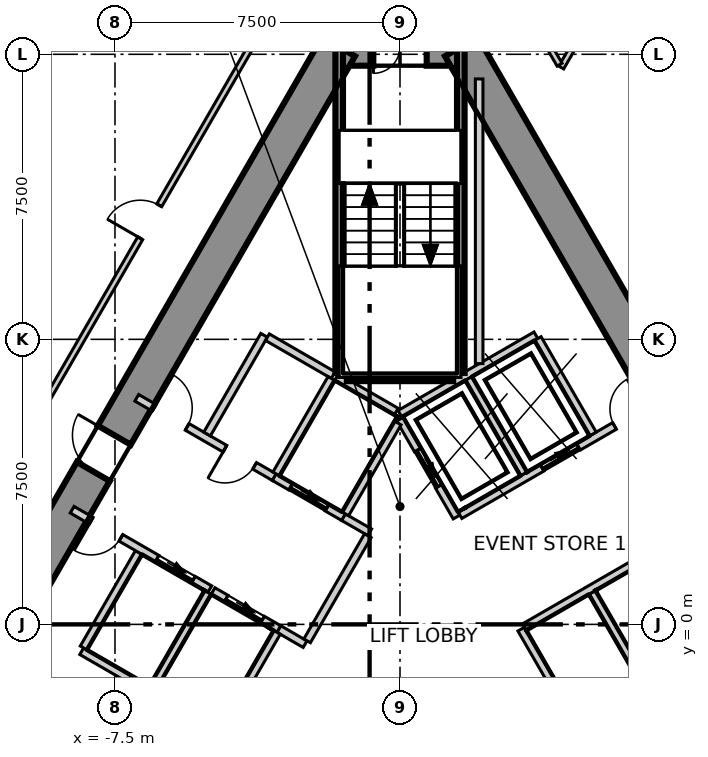
"""IFC4 building model, lengths in metres.
Left out: names, types, materials, properties, quantities, classifications, styles, units other than length and angle.
Written with IfcOpenShell. Run it as: python <this file> out.ifc"""

import sys

from ifc_helpers import new_model, si_unit, direction, frame, frame_2d, origin, place, context, subcontext, project, spatial, polyline, rectangle, outline, extrude, element, fill, save


model = new_model("IFC4")
c1 = context("Model", 3, precision=1e-05, world=origin(), true_north=direction((0.0, 1.0)))
c2 = subcontext(c1, "Body", "Model", "MODEL_VIEW")
j1 = project(units=[si_unit("LENGTHUNIT", "METRE"), si_unit("PLANEANGLEUNIT", "RADIAN")], contexts=[c1])
p1 = place(None, origin())
s1 = spatial("IfcSite", under=j1, at=p1, CompositionType="ELEMENT")
p2 = place(p1, origin())
s2 = spatial("IfcBuilding", under=s1, at=p2, CompositionType="ELEMENT")
p3 = place(p2, frame((0.0, 0.0, 30.3)))
s3 = spatial("IfcBuildingStorey", under=s2, at=p3, CompositionType="ELEMENT", Elevation=30.3)
p4 = place(p3, frame((1.617, 15.2, -0.4), z_axis=(0.0, 0.0, 1.0), x_axis=(-1.0, 0.0, 0.0)))
e1 = element("IfcWall", 1, at=p4, inside=s3, PredefinedType="SHEAR", context=c2, shape_type="SweptSolid", body=[
    extrude(outline(polyline([(-0.288, -0.5), (1.617, -0.5), (3.522, -0.5), (2.945, 0.5), (1.617, 0.5), (0.289, 0.5), (-0.288, -0.5)])), origin(), (0.0, 0.0, 1.0), 5.1),
])
p5 = place(p4, frame((0.917, 0.0, 0.4)))
e2 = element("IfcOpeningElement", 2, at=p5, cuts=e1, PredefinedType="OPENING", context=c2, shape_type="SweptSolid", body=[
    extrude(rectangle(XDim=1.4, YDim=2.1, at=frame_2d((0.7, 1.05))), frame((0.0, 0.51, 0.0), z_axis=(0.0, -1.0, 0.0), x_axis=(1.0, 0.0, 0.0)), (0.0, 0.0, 1.0), 1.02),
])
p6 = place(p3, frame((-1.617, 15.2, -0.4), z_axis=(0.0, 0.0, 1.0), x_axis=(-0.499992141631, -0.866029940768, 0.0)))
e3 = element("IfcWall", 3, at=p6, inside=s3, PredefinedType="SHEAR", context=c2, shape_type="SweptSolid", body=[
    extrude(outline(polyline([(-0.289, -0.499), (1.656, -0.499), (3.601, -0.499), (5.547, -0.499), (7.492, -0.499), (9.437, -0.5), (11.382, -0.5), (13.328, -0.5), (15.273, -0.5), (17.218, -0.5), (19.163, -0.5), (21.109, -0.5), (23.054, -0.5), (24.999, -0.5), (24.422, 0.5), (22.566, 0.5), (20.709, 0.5), (18.853, 0.5), (16.997, 0.5), (15.14, 0.5), (13.284, 0.5), (11.427, 0.5), (9.571, 0.5), (7.715, 0.5), (5.858, 0.5), (4.002, 0.5), (2.146, 0.5), (0.289, 0.5), (-0.289, -0.499)])), origin(), (0.0, 0.0, 1.0), 5.1),
])
p7 = place(p6, frame((11.805, 0.0, 0.4)))
e4 = element("IfcOpeningElement", 4, at=p7, cuts=e3, PredefinedType="OPENING", context=c2, shape_type="SweptSolid", body=[
    extrude(rectangle(XDim=1.1, YDim=2.1, at=frame_2d((0.55, 1.05))), frame((0.0, 0.51, 0.0), z_axis=(0.0, -1.0, 0.0), x_axis=(1.0, 0.0, 0.0)), (0.0, 0.0, 1.0), 1.02),
])
p8 = place(p3, frame((13.972, -6.2, -0.4), z_axis=(0.0, 0.0, 1.0), x_axis=(-0.499992141631, 0.866029940768, 0.0)))
e5 = element("IfcWall", 5, at=p8, inside=s3, PredefinedType="SHEAR", context=c2, shape_type="SweptSolid", body=[
    extrude(outline(polyline([(-0.288, -0.5), (1.657, -0.5), (3.602, -0.5), (5.547, -0.5), (7.493, -0.5), (9.438, -0.5), (11.383, -0.5), (13.328, -0.5), (15.273, -0.5), (17.218, -0.499), (19.164, -0.499), (21.109, -0.499), (23.054, -0.499), (24.999, -0.499), (24.422, 0.5), (22.566, 0.5), (20.709, 0.5), (18.853, 0.5), (16.996, 0.5), (15.14, 0.5), (13.283, 0.5), (11.427, 0.5), (9.57, 0.5), (7.714, 0.5), (5.857, 0.5), (4.001, 0.5), (2.145, 0.5), (0.288, 0.5), (-0.288, -0.5)])), origin(), (0.0, 0.0, 1.0), 5.1),
])
p9 = place(p8, frame((11.455, 0.0, 0.4)))
e6 = element("IfcOpeningElement", 6, at=p9, cuts=e5, PredefinedType="OPENING", context=c2, shape_type="SweptSolid", body=[
    extrude(rectangle(XDim=1.8, YDim=2.1, at=frame_2d((0.9, 1.05))), frame((0.0, 0.51, 0.0), z_axis=(0.0, -1.0, 0.0), x_axis=(1.0, 0.0, 0.0)), (0.0, 0.0, 1.0), 1.02),
])
p10 = place(p3, frame((-9.489, 5.565, 0.0), z_axis=(0.0, 0.0, 1.0), x_axis=(0.500030231307, 0.866007949028, 0.0)))
e7 = element("IfcWall", 7, at=p10, inside=s3, PredefinedType="PARTITIONING", context=c2, shape_type="SweptSolid", body=[
    extrude(rectangle(XDim=13.435, YDim=0.15, at=frame_2d((6.718, 0.0))), origin(), (0.0, 0.0, 1.0), 4.7),
])
p11 = place(p10, frame((5.307, 0.0, 0.0)))
e8 = element("IfcOpeningElement", 8, at=p11, cuts=e7, PredefinedType="OPENING", context=c2, shape_type="SweptSolid", body=[
    extrude(rectangle(XDim=1.0, YDim=2.1, at=frame_2d((0.5, 1.05))), frame((0.0, 0.085, 0.0), z_axis=(0.0, -1.0, 0.0), x_axis=(1.0, 0.0, 0.0)), (0.0, 0.0, 1.0), 0.17),
])
p12 = place(p3, frame((4.242, 14.652, 0.0), z_axis=(0.0, 0.0, 1.0), x_axis=(0.500016782699, 0.866015714072, 0.0)))
e9 = element("IfcWall", 9, at=p12, inside=s3, PredefinedType="PARTITIONING", context=c2, shape_type="SweptSolid", body=[
    extrude(rectangle(XDim=13.164, YDim=0.15, at=frame_2d((6.582, 0.0))), origin(), (0.0, 0.0, 1.0), 4.7),
])
p13 = place(p12, frame((3.858, 0.0, 0.0)))
e10 = element("IfcOpeningElement", 10, at=p13, cuts=e9, PredefinedType="OPENING", context=c2, shape_type="SweptSolid", body=[
    extrude(rectangle(XDim=1.0, YDim=2.1, at=frame_2d((0.5, 1.05))), frame((0.0, 0.085, 0.0), z_axis=(0.0, -1.0, 0.0), x_axis=(1.0, 0.0, 0.0)), (0.0, 0.0, 1.0), 0.17),
])
p14 = place(p12, frame((9.763, 0.0, 0.0)))
e11 = element("IfcOpeningElement", 11, at=p14, cuts=e9, PredefinedType="OPENING", context=c2, shape_type="SweptSolid", body=[
    extrude(rectangle(XDim=1.0, YDim=2.1, at=frame_2d((0.5, 1.05))), frame((0.0, 0.085, 0.0), z_axis=(0.0, -1.0, 0.0), x_axis=(1.0, 0.0, 0.0)), (0.0, 0.0, 1.0), 0.17),
])
p15 = place(p3, frame((2.771, 17.2, 0.0), z_axis=(0.0, 0.0, 1.0), x_axis=(0.500065346707, -0.865987672558, 0.0)))
e12 = element("IfcWall", 12, at=p15, inside=s3, PredefinedType="PARTITIONING", context=c2, shape_type="SweptSolid", body=[
    extrude(rectangle(XDim=2.855, YDim=0.15, at=frame_2d((1.428, 0.0))), origin(), (0.0, 0.0, 1.0), 4.7),
])
p16 = place(p3, frame((-8.376, -0.707, 0.0), z_axis=(0.0, 0.0, 1.0), x_axis=(0.866067520717, -0.499927044236, 0.0)))
e13 = element("IfcWall", 13, at=p16, inside=s3, PredefinedType="SOLIDWALL", context=c2, shape_type="SweptSolid", body=[
    extrude(rectangle(XDim=2.1, YDim=0.2, at=frame_2d((1.05, 0.0))), origin(), (0.0, 0.0, 1.0), 4.7),
])
p17 = place(p3, frame((-8.326, -0.62, 0.0), z_axis=(0.0, 0.0, 1.0), x_axis=(0.500023687443, 0.866011727401, 0.0)))
e14 = element("IfcWall", 14, at=p17, inside=s3, PredefinedType="SOLIDWALL", context=c2, shape_type="SweptSolid", body=[
    extrude(rectangle(XDim=2.9, YDim=0.2, at=frame_2d((1.45, 0.0))), origin(), (0.0, 0.0, 1.0), 4.7),
])
p18 = place(p3, frame((-0.002, 5.541, 0.0), z_axis=(0.0, 0.0, 1.0), x_axis=(0.86600155993, 0.500041296494, 0.0)))
e15 = element("IfcWall", 15, at=p18, inside=s3, PredefinedType="SOLIDWALL", context=c2, shape_type="SweptSolid", body=[
    extrude(rectangle(XDim=4.132, YDim=0.2, at=frame_2d((2.066, 0.0))), origin(), (0.0, 0.0, 1.0), 4.7),
])
p19 = place(p3, frame((0.0, 5.4, 0.0), z_axis=(0.0, 0.0, 1.0), x_axis=(0.500103862429, -0.865965430478, 0.0)))
e16 = element("IfcWall", 16, at=p19, inside=s3, PredefinedType="SOLIDWALL", context=c2, shape_type="SweptSolid", body=[
    extrude(rectangle(XDim=2.973, YDim=0.2, at=frame_2d((1.487, 0.0))), origin(), (0.0, 0.0, 1.0), 4.7),
])
p20 = place(p19, frame((0.937, 0.0, 0.0)))
e17 = element("IfcOpeningElement", 17, at=p20, cuts=e16, PredefinedType="OPENING", context=c2, shape_type="SweptSolid", body=[
    extrude(rectangle(XDim=1.1, YDim=2.1, at=frame_2d((0.55, 1.05))), frame((0.0, 0.11, 0.0), z_axis=(0.0, -1.0, 0.0), x_axis=(1.0, 0.0, 0.0)), (0.0, 0.0, 1.0), 0.22),
])
p21 = place(p3, frame((3.19, -0.125, 0.0), z_axis=(0.0, 0.0, 1.0), x_axis=(0.499988658015, -0.866031951983, 0.0)))
e18 = element("IfcWall", 18, at=p21, inside=s3, PredefinedType="SOLIDWALL", context=c2, shape_type="SweptSolid", body=[
    extrude(rectangle(XDim=2.858, YDim=0.2, at=frame_2d((1.429, 0.0))), origin(), (0.0, 0.0, 1.0), 4.7),
])
p22 = place(p3, frame((1.578, 2.874, 0.0), z_axis=(0.0, 0.0, 1.0), x_axis=(0.866055259465, 0.499948284879, 0.0)))
e19 = element("IfcWall", 19, at=p22, inside=s3, PredefinedType="SOLIDWALL", context=c2, shape_type="SweptSolid", body=[
    extrude(rectangle(XDim=6.177, YDim=0.2, at=frame_2d((3.088, 0.0))), origin(), (0.0, 0.0, 1.0), 4.7),
])
p23 = place(p22, frame((2.496, 0.0, 0.0)))
e20 = element("IfcOpeningElement", 20, at=p23, cuts=e19, PredefinedType="OPENING", context=c2, shape_type="SweptSolid", body=[
    extrude(rectangle(XDim=1.1, YDim=2.1, at=frame_2d((0.55, 1.05))), frame((0.0, 0.11, 0.0), z_axis=(0.0, -1.0, 0.0), x_axis=(1.0, 0.0, 0.0)), (0.0, 0.0, 1.0), 0.22),
])
p24 = place(p22, frame((4.696, 0.0, 0.0)))
e21 = element("IfcOpeningElement", 21, at=p24, cuts=e19, PredefinedType="OPENING", context=c2, shape_type="SweptSolid", body=[
    extrude(rectangle(XDim=0.9, YDim=2.1, at=frame_2d((0.45, 1.05))), frame((0.0, 0.11, 0.0), z_axis=(0.0, -1.0, 0.0), x_axis=(1.0, 0.0, 0.0)), (0.0, 0.0, 1.0), 0.22),
])
for number, where, z_axis, x_axis in (
    (22, (1.807, 6.47, 0.0), (0.0, 0.0, 1.0), (0.5, -0.866, 0.0)),
    (23, (5.057, 0.841, 0.0), (0.0, 0.0, 1.0), (0.5, -0.866, 0.0)),
    (24, (3.626, 7.52, 0.0), (0.0, 0.0, 1.0), (0.5, -0.866, 0.0)),
):
    element("IfcWall", number, at=place(p3, frame(where, z_axis=z_axis, x_axis=x_axis)), inside=s3, PredefinedType="SOLIDWALL", context=c2, shape_type="SweptSolid", body=[
        extrude(rectangle(XDim=2.9, YDim=0.2, at=frame_2d((1.45, 0.0))), origin(), (0.0, 0.0, 1.0), 4.7),
    ])
p25 = place(p3, frame((3.278, -0.071, 0.0), z_axis=(0.0, 0.0, 1.0), x_axis=(0.865959795517, 0.500113619639, 0.0)))
e25 = element("IfcWall", 25, at=p25, inside=s3, PredefinedType="SOLIDWALL", context=c2, shape_type="SweptSolid", body=[
    extrude(rectangle(XDim=6.177, YDim=0.2, at=frame_2d((3.088, 0.0))), origin(), (0.0, 0.0, 1.0), 4.7),
])
p26 = place(p25, frame((4.697, 0.0, 0.0)))
e26 = element("IfcOpeningElement", 26, at=p26, cuts=e25, PredefinedType="OPENING", context=c2, shape_type="SweptSolid", body=[
    extrude(rectangle(XDim=0.9, YDim=2.1, at=frame_2d((0.45, 1.05))), frame((0.0, 0.11, 0.0), z_axis=(0.0, -1.0, 0.0), x_axis=(1.0, 0.0, 0.0)), (0.0, 0.0, 1.0), 0.22),
])
p27 = place(p3, frame((4.9, -2.714, 0.0), z_axis=(0.0, 0.0, 1.0), x_axis=(0.865992350556, 0.500057245502, 0.0)))
e27 = element("IfcWall", 27, at=p27, inside=s3, PredefinedType="SOLIDWALL", context=c2, shape_type="SweptSolid", body=[
    extrude(rectangle(XDim=3.914, YDim=0.2, at=frame_2d((1.957, 0.0))), origin(), (0.0, 0.0, 1.0), 4.7),
])
p28 = place(p3, frame((-8.627, 3.018, 0.0), z_axis=(0.0, 0.0, 1.0), x_axis=(0.866039775641, -0.499975106388, 0.0)))
e28 = element("IfcWall", 28, at=p28, inside=s3, PredefinedType="SOLIDWALL", context=c2, shape_type="SweptSolid", body=[
    extrude(rectangle(XDim=4.182, YDim=0.2, at=frame_2d((2.091, 0.0))), origin(), (0.0, 0.0, 1.0), 4.7),
])
p29 = place(p28, frame((2.58, 0.0, 0.0)))
e29 = element("IfcOpeningElement", 29, at=p29, cuts=e28, PredefinedType="OPENING", context=c2, shape_type="SweptSolid", body=[
    extrude(rectangle(XDim=1.1, YDim=2.1, at=frame_2d((0.55, 1.05))), frame((0.0, 0.11, 0.0), z_axis=(0.0, -1.0, 0.0), x_axis=(1.0, 0.0, 0.0)), (0.0, 0.0, 1.0), 0.22),
])
p30 = place(p28, frame((0.58, 0.0, 0.0)))
e30 = element("IfcOpeningElement", 30, at=p30, cuts=e28, PredefinedType="OPENING", context=c2, shape_type="SweptSolid", body=[
    extrude(rectangle(XDim=0.9, YDim=2.1, at=frame_2d((0.45, 1.05))), frame((0.0, 0.11, 0.0), z_axis=(0.0, -1.0, 0.0), x_axis=(1.0, 0.0, 0.0)), (0.0, 0.0, 1.0), 0.22),
])
p31 = place(p3, frame((-3.188, -0.122, 0.0), z_axis=(0.0, 0.0, 1.0), x_axis=(0.865705793592, -0.50055317294, 0.0)))
e31 = element("IfcWall", 31, at=p31, inside=s3, PredefinedType="SOLIDWALL", context=c2, shape_type="SweptSolid", body=[
    extrude(rectangle(XDim=0.797, YDim=0.2, at=frame_2d((0.398, 0.0))), origin(), (0.0, 0.0, 1.0), 4.7),
])
p32 = place(p3, frame((-6.927, 5.962, 0.0), z_axis=(0.0, 0.0, 1.0), x_axis=(0.866065051207, -0.49993132236, 0.0)))
e32 = element("IfcWall", 32, at=p32, inside=s3, PredefinedType="SOLIDWALL", context=c2, shape_type="SweptSolid", body=[
    extrude(rectangle(XDim=4.182, YDim=0.2, at=frame_2d((2.091, 0.0))), origin(), (0.0, 0.0, 1.0), 4.7),
])
p33 = place(p32, frame((2.68, 0.0, 0.0)))
e33 = element("IfcOpeningElement", 33, at=p33, cuts=e32, PredefinedType="OPENING", context=c2, shape_type="SweptSolid", body=[
    extrude(rectangle(XDim=0.9, YDim=2.1, at=frame_2d((0.45, 1.05))), frame((0.0, 0.11, 0.0), z_axis=(0.0, -1.0, 0.0), x_axis=(1.0, 0.0, 0.0)), (0.0, 0.0, 1.0), 0.22),
])
p34 = place(p32, frame((0.53, 0.0, 0.0)))
e34 = element("IfcOpeningElement", 34, at=p34, cuts=e32, PredefinedType="OPENING", context=c2, shape_type="SweptSolid", body=[
    extrude(rectangle(XDim=1.0, YDim=2.1, at=frame_2d((0.5, 1.05))), frame((0.0, 0.11, 0.0), z_axis=(0.0, -1.0, 0.0), x_axis=(1.0, 0.0, 0.0)), (0.0, 0.0, 1.0), 0.22),
])
p35 = place(p3, frame((-1.488, 2.822, 0.0), z_axis=(0.0, 0.0, 1.0), x_axis=(0.866236612152, -0.499633997809, 0.0)))
e35 = element("IfcWall", 35, at=p35, inside=s3, PredefinedType="SOLIDWALL", context=c2, shape_type="SweptSolid", body=[
    extrude(rectangle(XDim=0.796, YDim=0.2, at=frame_2d((0.398, 0.0))), origin(), (0.0, 0.0, 1.0), 4.7),
])
p36 = place(p3, frame((-5.076, 5.009, 0.0), z_axis=(0.0, 0.0, 1.0), x_axis=(0.50002537861, 0.866010750942, 0.0)))
e36 = element("IfcWall", 36, at=p36, inside=s3, PredefinedType="SOLIDWALL", context=c2, shape_type="SweptSolid", body=[
    extrude(rectangle(XDim=3.0, YDim=0.2, at=frame_2d((1.5, 0.0))), origin(), (0.0, 0.0, 1.0), 4.7),
])
p37 = place(p3, frame((-3.489, 7.557, 0.0), z_axis=(0.0, 0.0, 1.0), x_axis=(0.866010750942, -0.50002537861, 0.0)))
e37 = element("IfcWall", 37, at=p37, inside=s3, PredefinedType="SOLIDWALL", context=c2, shape_type="SweptSolid", body=[
    extrude(rectangle(XDim=2.0, YDim=0.2, at=frame_2d((1.0, 0.0))), origin(), (0.0, 0.0, 1.0), 4.7),
])
p38 = place(p3, frame((-2.444, -0.433, 0.0), z_axis=(0.0, 0.0, 1.0), x_axis=(0.500035624827, 0.866004834804, 0.0)))
e38 = element("IfcWall", 38, at=p38, inside=s3, PredefinedType="SOLIDWALL", context=c2, shape_type="SweptSolid", body=[
    extrude(rectangle(XDim=3.194, YDim=0.2, at=frame_2d((1.597, 0.0))), origin(), (0.0, 0.0, 1.0), 4.7),
])
p39 = place(p3, frame((-6.507, -1.67, 0.0), z_axis=(0.0, 0.0, 1.0), x_axis=(0.50012328804, 0.865954211699, 0.0)))
e39 = element("IfcWall", 39, at=p39, inside=s3, PredefinedType="SOLIDWALL", context=c2, shape_type="SweptSolid", body=[
    extrude(rectangle(XDim=2.9, YDim=0.2, at=frame_2d((1.45, 0.0))), origin(), (0.0, 0.0, 1.0), 4.7),
])
p40 = place(p3, frame((-4.92, 0.878, 0.0), z_axis=(0.0, 0.0, 1.0), x_axis=(0.866010750942, -0.50002537861, 0.0)))
e40 = element("IfcWall", 40, at=p40, inside=s3, PredefinedType="SOLIDWALL", context=c2, shape_type="SweptSolid", body=[
    extrude(rectangle(XDim=2.0, YDim=0.2, at=frame_2d((1.0, 0.0))), origin(), (0.0, 0.0, 1.0), 4.7),
])
p41 = place(p40, frame((0.4, 0.0, 0.0)))
e41 = element("IfcOpeningElement", 41, at=p41, cuts=e40, PredefinedType="OPENING", context=c2, shape_type="SweptSolid", body=[
    extrude(rectangle(XDim=1.1, YDim=2.1, at=frame_2d((0.55, 1.05))), frame((0.0, 0.11, 0.0), z_axis=(0.0, -1.0, 0.0), x_axis=(1.0, 0.0, 0.0)), (0.0, 0.0, 1.0), 0.22),
])
p42 = place(p3, frame((-4.619, -2.6, 0.0), z_axis=(0.0, 0.0, 1.0), x_axis=(0.50009492287, 0.865970593103, 0.0)))
e42 = element("IfcWall", 42, at=p42, inside=s3, PredefinedType="SOLIDWALL", context=c2, shape_type="SweptSolid", body=[
    extrude(rectangle(XDim=2.761, YDim=0.2, at=frame_2d((1.381, 0.0))), origin(), (0.0, 0.0, 1.0), 4.7),
])
p43 = place(p3, frame((-3.309, 3.873, 0.0), z_axis=(0.0, 0.0, 1.0), x_axis=(0.866098583652, -0.499873227325, 0.0)))
e43 = element("IfcWall", 43, at=p43, inside=s3, PredefinedType="SOLIDWALL", context=c2, shape_type="SweptSolid", body=[
    extrude(rectangle(XDim=2.103, YDim=0.2, at=frame_2d((1.051, 0.0))), origin(), (0.0, 0.0, 1.0), 4.7),
])
p44 = place(p43, frame((0.502, 0.0, 0.0)))
e44 = element("IfcOpeningElement", 44, at=p44, cuts=e43, PredefinedType="OPENING", context=c2, shape_type="SweptSolid", body=[
    extrude(rectangle(XDim=1.1, YDim=2.1, at=frame_2d((0.55, 1.05))), frame((0.0, 0.11, 0.0), z_axis=(0.0, -1.0, 0.0), x_axis=(1.0, 0.0, 0.0)), (0.0, 0.0, 1.0), 0.22),
])
p45 = place(p3, frame((-3.257, 3.959, 0.0), z_axis=(0.0, 0.0, 1.0), x_axis=(0.50012328804, 0.865954211699, 0.0)))
e45 = element("IfcWall", 45, at=p45, inside=s3, PredefinedType="SOLIDWALL", context=c2, shape_type="SweptSolid", body=[
    extrude(rectangle(XDim=2.9, YDim=0.2, at=frame_2d((1.45, 0.0))), origin(), (0.0, 0.0, 1.0), 4.7),
])
p46 = place(p3, frame((-1.67, 6.507, 0.0), z_axis=(0.0, 0.0, 1.0), x_axis=(0.865941441609, -0.500145398563, 0.0)))
e46 = element("IfcWall", 46, at=p46, inside=s3, PredefinedType="SOLIDWALL", context=c2, shape_type="SweptSolid", body=[
    extrude(rectangle(XDim=1.815, YDim=0.2, at=frame_2d((0.908, 0.0))), origin(), (0.0, 0.0, 1.0), 4.7),
])
p47 = place(p3, frame((-1.438, 2.909, 0.0), z_axis=(0.0, 0.0, 1.0), x_axis=(0.499829630636, 0.866123744241, 0.0)))
e47 = element("IfcWall", 47, at=p47, inside=s3, PredefinedType="SOLIDWALL", context=c2, shape_type="SweptSolid", body=[
    extrude(rectangle(XDim=2.761, YDim=0.2, at=frame_2d((1.38, 0.0))), origin(), (0.0, 0.0, 1.0), 4.7),
])
p48 = place(p3, frame((2.083, 6.861, 0.0), z_axis=(0.0, 0.0, 1.0), x_axis=(0.0, 1.0, 0.0)))
e48 = element("IfcWall", 48, at=p48, inside=s3, PredefinedType="SOLIDWALL", context=c2, shape_type="SweptSolid", body=[
    extrude(rectangle(XDim=7.491, YDim=0.2, at=frame_2d((3.746, 0.0))), origin(), (0.0, 0.0, 1.0), 4.7),
])
p49 = place(p3, frame((1.6, 6.615, 0.0), z_axis=(0.0, 0.0, 1.0), x_axis=(0.0, 1.0, 0.0)))
e49 = element("IfcWall", 49, at=p49, inside=s3, PredefinedType="SOLIDWALL", context=c2, shape_type="SweptSolid", body=[
    extrude(rectangle(XDim=8.565, YDim=0.2, at=frame_2d((4.282, 0.0))), origin(), (0.0, 0.0, 1.0), 4.7),
])
p50 = place(p3, frame((-1.4, 6.5, 0.0), z_axis=(0.0, 0.0, 1.0), x_axis=(1.0, 0.0, 0.0)))
e50 = element("IfcWall", 50, at=p50, inside=s3, PredefinedType="SOLIDWALL", context=c2, shape_type="SweptSolid", body=[
    extrude(rectangle(XDim=2.8, YDim=0.2, at=frame_2d((1.4, 0.0))), origin(), (0.0, 0.0, 1.0), 4.7),
])
p51 = place(p3, frame((-1.6, 6.615, 0.0), z_axis=(0.0, 0.0, 1.0), x_axis=(0.0, 1.0, 0.0)))
e51 = element("IfcWall", 51, at=p51, inside=s3, PredefinedType="SOLIDWALL", context=c2, shape_type="SweptSolid", body=[
    extrude(rectangle(XDim=8.565, YDim=0.2, at=frame_2d((4.282, 0.0))), origin(), (0.0, 0.0, 1.0), 4.7),
])
p52 = place(p20, origin())
e52 = element("IfcDoor", 52, at=p52, inside=s3, OperationType="SLIDING_TO_LEFT", PredefinedType="DOOR", context=c2, shape_type="SweptSolid", body=[
    extrude(rectangle(XDim=1.1, YDim=2.1, at=frame_2d((0.55, 1.05))), frame((0.0, 0.025, 0.0), z_axis=(0.0, -1.0, 0.0), x_axis=(1.0, 0.0, 0.0)), (0.0, 0.0, 1.0), 0.05),
])
fill(e17, e52)
p53 = place(p23, origin())
e53 = element("IfcDoor", 53, at=p53, inside=s3, OperationType="SLIDING_TO_LEFT", PredefinedType="DOOR", context=c2, shape_type="SweptSolid", body=[
    extrude(rectangle(XDim=1.1, YDim=2.1, at=frame_2d((0.55, 1.05))), frame((0.0, 0.025, 0.0), z_axis=(0.0, -1.0, 0.0), x_axis=(1.0, 0.0, 0.0)), (0.0, 0.0, 1.0), 0.05),
])
fill(e20, e53)
p54 = place(p41, origin())
e54 = element("IfcDoor", 54, at=p54, inside=s3, OperationType="SLIDING_TO_LEFT", PredefinedType="DOOR", context=c2, shape_type="SweptSolid", body=[
    extrude(rectangle(XDim=1.1, YDim=2.1, at=frame_2d((0.55, 1.05))), frame((0.0, 0.025, 0.0), z_axis=(0.0, -1.0, 0.0), x_axis=(1.0, 0.0, 0.0)), (0.0, 0.0, 1.0), 0.05),
])
fill(e41, e54)
p55 = place(p44, origin())
e55 = element("IfcDoor", 55, at=p55, inside=s3, OperationType="SLIDING_TO_LEFT", PredefinedType="DOOR", context=c2, shape_type="SweptSolid", body=[
    extrude(rectangle(XDim=1.1, YDim=2.1, at=frame_2d((0.55, 1.05))), frame((0.0, 0.025, 0.0), z_axis=(0.0, -1.0, 0.0), x_axis=(1.0, 0.0, 0.0)), (0.0, 0.0, 1.0), 0.05),
])
fill(e44, e55)
p56 = place(p29, origin())
e56 = element("IfcDoor", 56, at=p56, inside=s3, OperationType="SLIDING_TO_LEFT", PredefinedType="DOOR", context=c2, shape_type="SweptSolid", body=[
    extrude(rectangle(XDim=1.1, YDim=2.1, at=frame_2d((0.55, 1.05))), frame((0.0, 0.025, 0.0), z_axis=(0.0, -1.0, 0.0), x_axis=(1.0, 0.0, 0.0)), (0.0, 0.0, 1.0), 0.05),
])
fill(e29, e56)
p57 = place(p33, origin())
e57 = element("IfcDoor", 57, at=p57, inside=s3, OperationType="SINGLE_SWING_LEFT", PredefinedType="DOOR", context=c2, shape_type="SweptSolid", body=[
    extrude(rectangle(XDim=0.9, YDim=2.1, at=frame_2d((0.45, 1.05))), frame((0.0, 0.025, 0.0), z_axis=(0.0, -1.0, 0.0), x_axis=(1.0, 0.0, 0.0)), (0.0, 0.0, 1.0), 0.05),
])
fill(e33, e57)
p58 = place(p11, origin())
e58 = element("IfcDoor", 58, at=p58, inside=s3, OperationType="SINGLE_SWING_RIGHT", PredefinedType="DOOR", context=c2, shape_type="SweptSolid", body=[
    extrude(rectangle(XDim=1.0, YDim=2.1, at=frame_2d((0.5, 1.05))), frame((0.0, 0.025, 0.0), z_axis=(0.0, -1.0, 0.0), x_axis=(1.0, 0.0, 0.0)), (0.0, 0.0, 1.0), 0.05),
])
fill(e8, e58)
p59 = place(p7, origin())
e59 = element("IfcDoor", 59, at=p59, inside=s3, OperationType="SINGLE_SWING_LEFT", PredefinedType="DOOR", context=c2, shape_type="SweptSolid", body=[
    extrude(rectangle(XDim=1.1, YDim=2.1, at=frame_2d((0.55, 1.05))), frame((0.0, 0.025, 0.0), z_axis=(0.0, -1.0, 0.0), x_axis=(1.0, 0.0, 0.0)), (0.0, 0.0, 1.0), 0.05),
])
fill(e4, e59)
p60 = place(p30, origin())
e60 = element("IfcDoor", 60, at=p60, inside=s3, OperationType="SINGLE_SWING_LEFT", PredefinedType="DOOR", context=c2, shape_type="SweptSolid", body=[
    extrude(rectangle(XDim=0.9, YDim=2.1, at=frame_2d((0.45, 1.05))), frame((0.0, 0.025, 0.0), z_axis=(0.0, -1.0, 0.0), x_axis=(1.0, 0.0, 0.0)), (0.0, 0.0, 1.0), 0.05),
])
fill(e30, e60)
p61 = place(p34, origin())
e61 = element("IfcDoor", 61, at=p61, inside=s3, OperationType="SINGLE_SWING_RIGHT", PredefinedType="DOOR", context=c2, shape_type="SweptSolid", body=[
    extrude(rectangle(XDim=1.0, YDim=2.1, at=frame_2d((0.5, 1.05))), frame((0.0, 0.025, 0.0), z_axis=(0.0, -1.0, 0.0), x_axis=(1.0, 0.0, 0.0)), (0.0, 0.0, 1.0), 0.05),
])
fill(e34, e61)
p62 = place(p24, origin())
e62 = element("IfcDoor", 62, at=p62, inside=s3, OperationType="SINGLE_SWING_LEFT", PredefinedType="DOOR", context=c2, shape_type="SweptSolid", body=[
    extrude(rectangle(XDim=0.9, YDim=2.1, at=frame_2d((0.45, 1.05))), frame((0.0, 0.025, 0.0), z_axis=(0.0, -1.0, 0.0), x_axis=(1.0, 0.0, 0.0)), (0.0, 0.0, 1.0), 0.05),
])
fill(e21, e62)
save(model, sys.argv[1])
